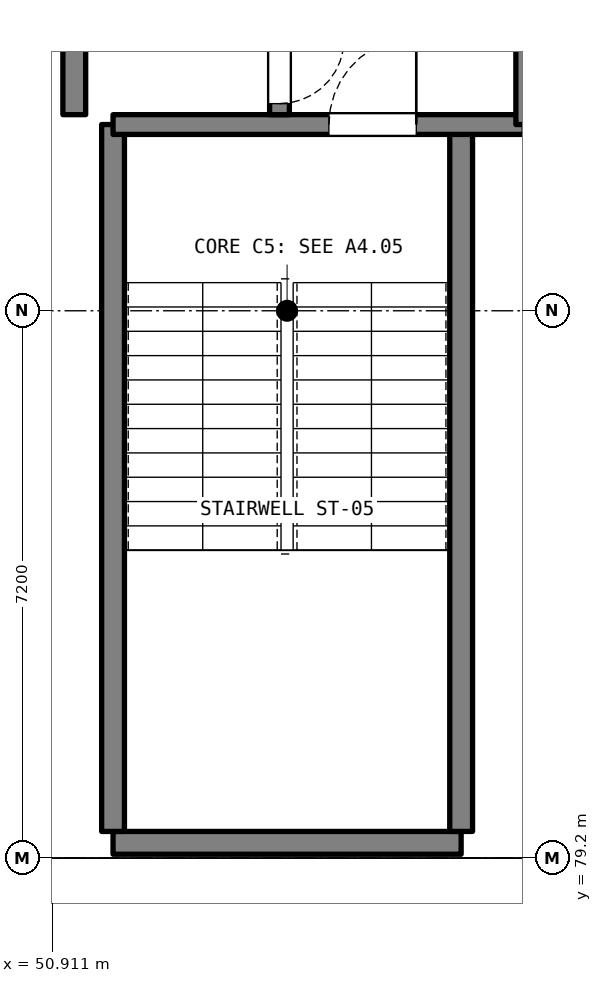
"""IFC4 building model, lengths in metres.
Left out: names, types, materials, properties, quantities, classifications, styles, units other than length and angle.
Written with IfcOpenShell. Run it as: python <this file> out.ifc"""

import sys

from ifc_helpers import new_model, si_unit, direction, frame, frame_2d, origin, place, context, subcontext, project, spatial, rectangle, extrude, element, fill, save


model = new_model("IFC4")
c1 = context("Model", 3, precision=1e-05, world=origin(), true_north=direction((0.0, 1.0)))
c2 = subcontext(c1, "Body", "Model", "MODEL_VIEW")
j1 = project(units=[si_unit("LENGTHUNIT", "METRE"), si_unit("PLANEANGLEUNIT", "RADIAN")], contexts=[c1])
p1 = place(None, origin())
s1 = spatial("IfcSite", under=j1, at=p1, CompositionType="ELEMENT")
p2 = place(p1, origin())
s2 = spatial("IfcBuilding", under=s1, at=p2, CompositionType="ELEMENT")
p3 = place(p2, frame((0.0, 0.0, 14.1)))
s3 = spatial("IfcBuildingStorey", under=s2, at=p3, CompositionType="ELEMENT", Elevation=14.1)
p4 = place(p3, frame((51.71, 79.4, 0.0), z_axis=(0.0, 0.0, 1.0), x_axis=(1.0, 0.0, 0.0)))
e1 = element("IfcWall", 1, at=p4, inside=s3, PredefinedType="SHEAR", context=c2, shape_type="SweptSolid", body=[
    extrude(rectangle(XDim=4.58, YDim=0.3, at=frame_2d((2.29, 0.0))), origin(), (0.0, 0.0, 1.0), 3.72),
])
for number, where, z_axis, x_axis in (
    (2, (51.71, 79.55, 0.0), (0.0, 0.0, 1.0), (0.0, 1.0, 0.0)),
    (3, (56.29, 79.55, 0.0), (0.0, 0.0, 1.0), (0.0, 1.0, 0.0)),
):
    element("IfcWall", number, at=place(p3, frame(where, z_axis=z_axis, x_axis=x_axis)), inside=s3, PredefinedType="SHEAR", context=c2, shape_type="SweptSolid", body=[
        extrude(rectangle(XDim=9.3, YDim=0.3, at=frame_2d((4.65, 0.0))), origin(), (0.0, 0.0, 1.0), 3.72),
    ])
p5 = place(p3, frame((51.71, 88.85, 0.0), z_axis=(0.0, 0.0, 1.0), x_axis=(1.0, 0.0, 0.0)))
e4 = element("IfcWall", 4, at=p5, inside=s3, PredefinedType="SHEAR", context=c2, shape_type="SweptSolid", body=[
    extrude(rectangle(XDim=5.41, YDim=0.26, at=frame_2d((2.705, 0.0))), origin(), (0.0, 0.0, 1.0), 3.72),
])
p6 = place(p5, frame((2.84, 0.0, 0.0)))
e5 = element("IfcOpeningElement", 5, at=p6, cuts=e4, PredefinedType="OPENING", context=c2, shape_type="SweptSolid", body=[
    extrude(rectangle(XDim=1.15, YDim=2.15, at=frame_2d((0.575, 1.075))), frame((0.0, 0.14, 0.0), z_axis=(0.0, -1.0, 0.0), x_axis=(1.0, 0.0, 0.0)), (0.0, 0.0, 1.0), 0.28),
])
p7 = place(p3, frame((51.2, 88.98, 0.0), z_axis=(0.0, 0.0, 1.0), x_axis=(0.0, 1.0, 0.0)))
e6 = element("IfcWall", 6, at=p7, inside=s3, PredefinedType="SHEAR", context=c2, shape_type="SweptSolid", body=[
    extrude(rectangle(XDim=4.32, YDim=0.3, at=frame_2d((2.16, 0.0))), origin(), (0.0, 0.0, 1.0), 3.72),
])
p8 = place(p3, frame((53.9, 93.3, 0.0), z_axis=(0.0, 0.0, 1.0), x_axis=(0.0, -1.0, 0.0)))
e7 = element("IfcWall", 7, at=p8, inside=s3, PredefinedType="SHEAR", context=c2, shape_type="SweptSolid", body=[
    extrude(rectangle(XDim=4.32, YDim=0.26, at=frame_2d((2.16, 0.0))), origin(), (0.0, 0.0, 1.0), 3.72),
])
p9 = place(p8, frame((1.05, 0.0, 0.0)))
e8 = element("IfcOpeningElement", 8, at=p9, cuts=e7, PredefinedType="OPENING", context=c2, shape_type="SweptSolid", body=[
    extrude(rectangle(XDim=1.1, YDim=2.15, at=frame_2d((0.55, 1.075))), frame((0.0, 0.14, 0.0), z_axis=(0.0, -1.0, 0.0), x_axis=(1.0, 0.0, 0.0)), (0.0, 0.0, 1.0), 0.28),
])
p10 = place(p8, frame((3.325, 0.0, 0.0)))
e9 = element("IfcOpeningElement", 9, at=p10, cuts=e7, PredefinedType="OPENING", context=c2, shape_type="SweptSolid", body=[
    extrude(rectangle(XDim=0.85, YDim=2.05, at=frame_2d((0.425, 1.025))), frame((0.0, 0.14, 0.0), z_axis=(0.0, -1.0, 0.0), x_axis=(1.0, 0.0, 0.0)), (0.0, 0.0, 1.0), 0.28),
])
p11 = place(p3, frame((57.12, 93.3, 0.0), z_axis=(0.0, 0.0, 1.0), x_axis=(0.0, -1.0, 0.0)))
e10 = element("IfcWall", 10, at=p11, inside=s3, PredefinedType="SHEAR", context=c2, shape_type="SweptSolid", body=[
    extrude(rectangle(XDim=4.45, YDim=0.22, at=frame_2d((2.225, 0.0))), origin(), (0.0, 0.0, 1.0), 3.72),
])
p12 = place(p11, frame((1.625, 0.0, 0.0)))
e11 = element("IfcOpeningElement", 11, at=p12, cuts=e10, PredefinedType="OPENING", context=c2, shape_type="SweptSolid", body=[
    extrude(rectangle(XDim=1.45, YDim=2.2, at=frame_2d((0.725, 1.1))), frame((0.0, 0.12, 0.0), z_axis=(0.0, -1.0, 0.0), x_axis=(1.0, 0.0, 0.0)), (0.0, 0.0, 1.0), 0.24),
])
p13 = place(p6, origin())
e12 = element("IfcDoor", 12, at=p13, inside=s3, OperationType="SINGLE_SWING_RIGHT", PredefinedType="DOOR", context=c2, shape_type="SweptSolid", body=[
    extrude(rectangle(XDim=1.15, YDim=2.15, at=frame_2d((0.575, 1.075))), frame((0.0, 0.025, 0.0), z_axis=(0.0, -1.0, 0.0), x_axis=(1.0, 0.0, 0.0)), (0.0, 0.0, 1.0), 0.05),
])
fill(e5, e12)
p14 = place(p10, origin())
e13 = element("IfcDoor", 13, at=p14, inside=s3, OperationType="SINGLE_SWING_LEFT", PredefinedType="DOOR", context=c2, shape_type="SweptSolid", body=[
    extrude(rectangle(XDim=0.85, YDim=2.05, at=frame_2d((0.425, 1.025))), frame((0.0, 0.025, 0.0), z_axis=(0.0, -1.0, 0.0), x_axis=(1.0, 0.0, 0.0)), (0.0, 0.0, 1.0), 0.05),
])
fill(e9, e13)
save(model, sys.argv[1])
